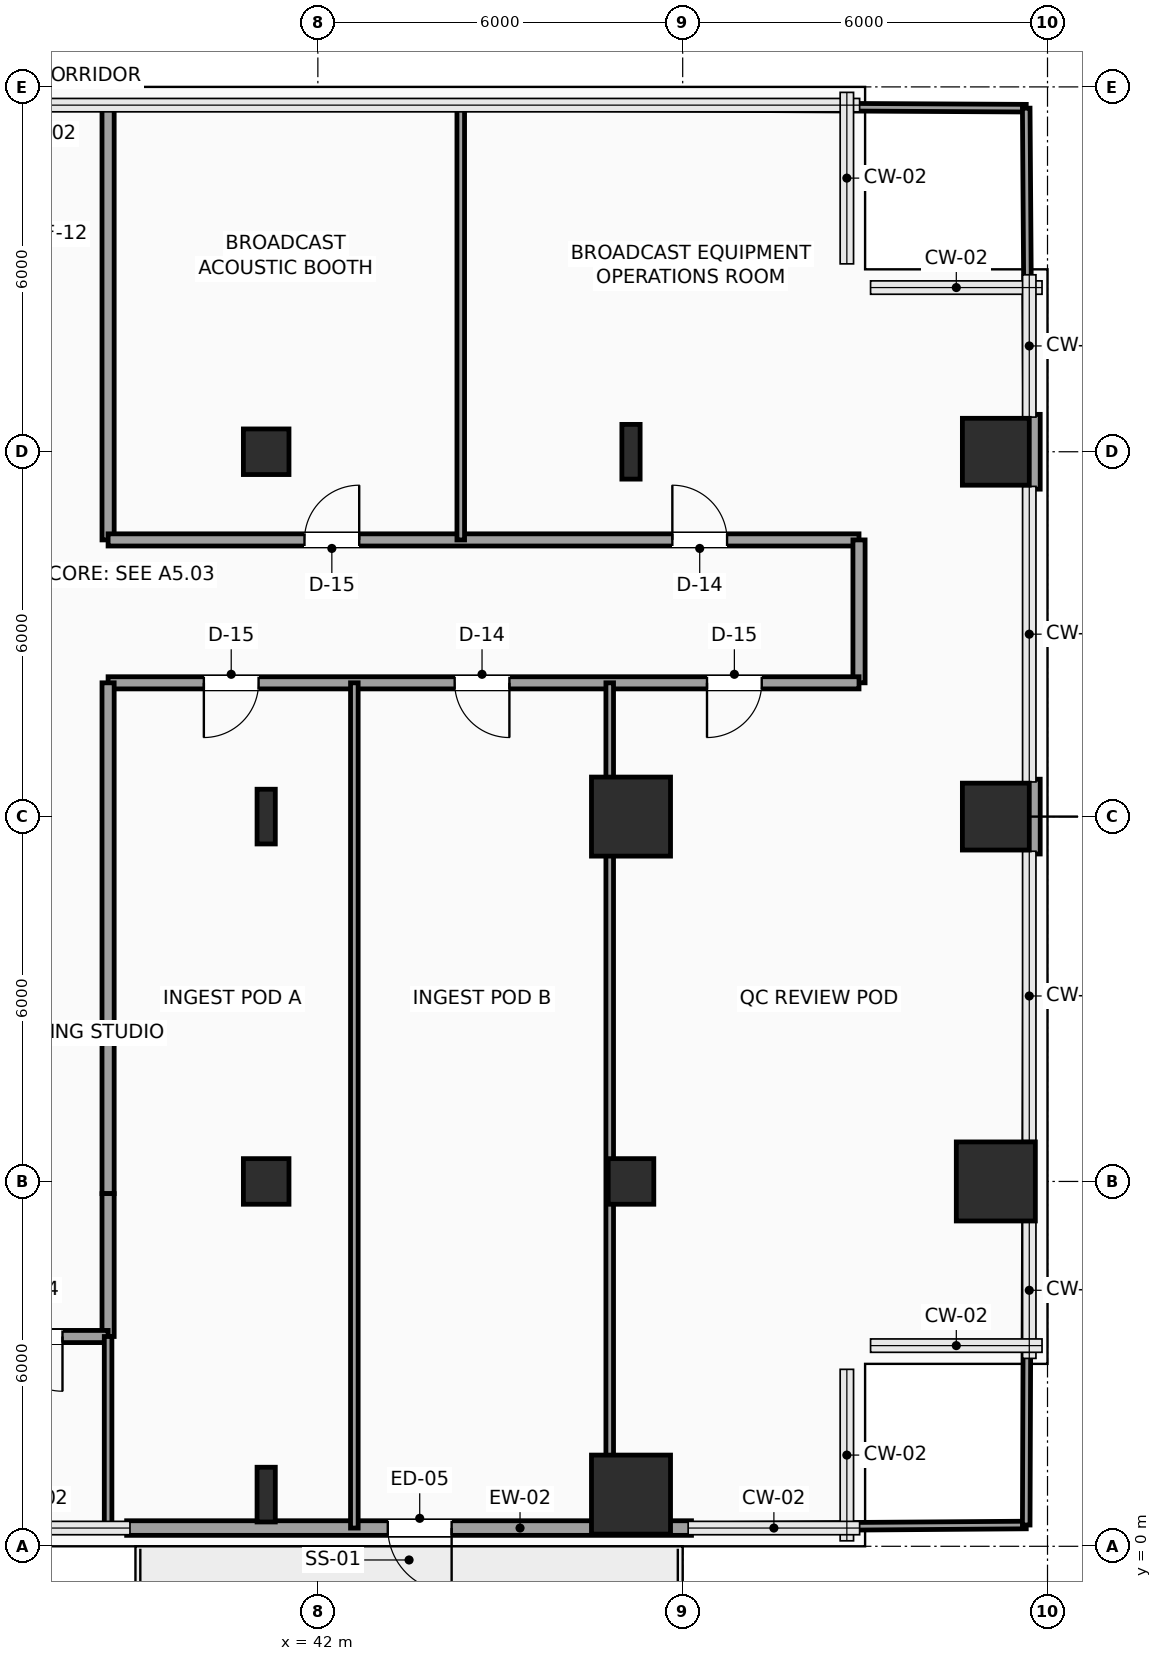
"""IFC4 building model, lengths in metres.
Left out: names, types, materials, properties, quantities, classifications, styles, units other than length and angle.
Written with IfcOpenShell. Run it as: python <this file> out.ifc"""

import sys

from ifc_helpers import new_model, si_unit, direction, frame, frame_2d, origin, origin_2d, place, context, subcontext, project, spatial, rectangle, hollow_rectangle, i_section, extrude, element, fill, save


model = new_model("IFC4")
c1 = context("Model", 3, precision=1e-05, world=origin(), true_north=direction((0.0, 1.0)))
c2 = subcontext(c1, "Body", "Model", "MODEL_VIEW")
j1 = project(units=[si_unit("LENGTHUNIT", "METRE"), si_unit("PLANEANGLEUNIT", "RADIAN")], contexts=[c1])
p1 = place(None, origin())
s1 = spatial("IfcSite", under=j1, at=p1, CompositionType="ELEMENT")
p2 = place(p1, origin())
s2 = spatial("IfcBuilding", under=s1, at=p2, CompositionType="ELEMENT")
p3 = place(p2, frame((0.0, 0.0, 44.1)))
s3 = spatial("IfcBuildingStorey", under=s2, at=p3, CompositionType="ELEMENT", Elevation=44.1)
p4 = place(p3, frame((41.15, 0.85, 0.0), z_axis=(0.0, 0.0, 1.0), x_axis=(1.0, 0.0, 0.0)))
e1 = element("IfcColumn", 1, at=p4, inside=s3, PredefinedType="COLUMN", context=c2, shape_type="SweptSolid", body=[
    extrude(i_section(OverallWidth=0.3, OverallDepth=0.9, WebThickness=0.019, FlangeThickness=0.035, FilletRadius=0.03, at=origin_2d()), origin(), (0.0, 0.0, 1.0), 3.9),
])
p5 = place(p3, frame((41.15, 6.0, 0.0), z_axis=(0.0, 0.0, 1.0), x_axis=(1.0, 0.0, 0.0)))
e2 = element("IfcColumn", 2, at=p5, inside=s3, PredefinedType="COLUMN", context=c2, shape_type="SweptSolid", body=[
    extrude(hollow_rectangle(XDim=0.75, YDim=0.75, WallThickness=0.035, InnerFilletRadius=0.035, OuterFilletRadius=0.05, at=origin_2d()), origin(), (0.0, 0.0, 1.0), 3.9),
])
p6 = place(p3, frame((41.15, 12.0, 0.0), z_axis=(0.0, 0.0, 1.0), x_axis=(1.0, 0.0, 0.0)))
e3 = element("IfcColumn", 3, at=p6, inside=s3, PredefinedType="COLUMN", context=c2, shape_type="SweptSolid", body=[
    extrude(i_section(OverallWidth=0.3, OverallDepth=0.9, WebThickness=0.019, FlangeThickness=0.035, FilletRadius=0.03, at=origin_2d()), origin(), (0.0, 0.0, 1.0), 3.9),
])
p7 = place(p3, frame((41.15, 18.0, 0.0), z_axis=(0.0, 0.0, 1.0), x_axis=(1.0, 0.0, 0.0)))
e4 = element("IfcColumn", 4, at=p7, inside=s3, PredefinedType="COLUMN", context=c2, shape_type="SweptSolid", body=[
    extrude(hollow_rectangle(XDim=0.75, YDim=0.75, WallThickness=0.035, InnerFilletRadius=0.035, OuterFilletRadius=0.05, at=origin_2d()), origin(), (0.0, 0.0, 1.0), 3.9),
])
p8 = place(p3, frame((47.15, 0.85, 0.0), z_axis=(0.0, 0.0, 1.0), x_axis=(1.0, 0.0, 0.0)))
e5 = element("IfcColumn", 5, at=p8, inside=s3, PredefinedType="COLUMN", context=c2, shape_type="SweptSolid", body=[
    extrude(rectangle(XDim=1.3, YDim=1.3, at=origin_2d()), origin(), (0.0, 0.0, 1.0), 3.9),
])
p9 = place(p3, frame((47.15, 6.0, 0.0), z_axis=(0.0, 0.0, 1.0), x_axis=(1.0, 0.0, 0.0)))
e6 = element("IfcColumn", 6, at=p9, inside=s3, PredefinedType="COLUMN", context=c2, shape_type="SweptSolid", body=[
    extrude(hollow_rectangle(XDim=0.75, YDim=0.75, WallThickness=0.035, InnerFilletRadius=0.035, OuterFilletRadius=0.05, at=origin_2d()), origin(), (0.0, 0.0, 1.0), 3.9),
])
p10 = place(p3, frame((47.15, 12.0, 0.0), z_axis=(0.0, 0.0, 1.0), x_axis=(1.0, 0.0, 0.0)))
e7 = element("IfcColumn", 7, at=p10, inside=s3, PredefinedType="COLUMN", context=c2, shape_type="SweptSolid", body=[
    extrude(rectangle(XDim=1.3, YDim=1.3, at=origin_2d()), origin(), (0.0, 0.0, 1.0), 3.9),
])
p11 = place(p3, frame((47.15, 18.0, 0.0), z_axis=(0.0, 0.0, 1.0), x_axis=(1.0, 0.0, 0.0)))
e8 = element("IfcColumn", 8, at=p11, inside=s3, PredefinedType="COLUMN", context=c2, shape_type="SweptSolid", body=[
    extrude(i_section(OverallWidth=0.3, OverallDepth=0.9, WebThickness=0.019, FlangeThickness=0.035, FilletRadius=0.03, at=origin_2d()), origin(), (0.0, 0.0, 1.0), 3.9),
])
p12 = place(p3, frame((53.15, 6.0, 0.0), z_axis=(0.0, 0.0, 1.0), x_axis=(1.0, 0.0, 0.0)))
e9 = element("IfcColumn", 9, at=p12, inside=s3, PredefinedType="COLUMN", context=c2, shape_type="SweptSolid", body=[
    extrude(rectangle(XDim=1.3, YDim=1.3, at=origin_2d()), origin(), (0.0, 0.0, 1.0), 3.9),
])
for number, where, z_axis, x_axis in (
    (10, (53.15, 12.0, 0.0), (0.0, 0.0, 1.0), (1.0, 0.0, 0.0)),
    (11, (53.15, 18.0, 0.0), (0.0, 0.0, 1.0), (1.0, 0.0, 0.0)),
):
    element("IfcColumn", number, at=place(p3, frame(where, z_axis=z_axis, x_axis=x_axis)), inside=s3, PredefinedType="COLUMN", context=c2, shape_type="SweptSolid", body=[
        extrude(rectangle(XDim=1.1, YDim=1.1, at=origin_2d()), origin(), (0.0, 0.0, 1.0), 3.9),
    ])
p13 = place(p3, frame((48.145, 0.3, 0.0), z_axis=(0.0, 0.0, 1.0), x_axis=(-1.0, 0.0, 0.0)))
e12 = element("IfcWall", 12, at=p13, inside=s3, PredefinedType="SOLIDWALL", context=c2, shape_type="SweptSolid", body=[
    extrude(rectangle(XDim=9.29, YDim=0.24, at=frame_2d((4.645, 0.0))), origin(), (0.0, 0.0, 1.0), 3.65),
])
p14 = place(p13, frame((3.945, 0.0, 0.0)))
e13 = element("IfcOpeningElement", 13, at=p14, cuts=e12, PredefinedType="OPENING", context=c2, shape_type="SweptSolid", body=[
    extrude(rectangle(XDim=1.05, YDim=2.2, at=frame_2d((0.525, 1.1))), frame((0.0, 0.13, 0.0), z_axis=(0.0, -1.0, 0.0), x_axis=(1.0, 0.0, 0.0)), (0.0, 0.0, 1.0), 0.26),
])
for number, where, z_axis, x_axis in (
    (14, (53.76, 18.615, 0.0), (0.0, 0.0, 1.0), (0.0, -1.0, 0.0)),
    (15, (53.76, 12.615, 0.0), (0.0, 0.0, 1.0), (0.0, -1.0, 0.0)),
):
    element("IfcWall", number, at=place(p3, frame(where, z_axis=z_axis, x_axis=x_axis)), inside=s3, PredefinedType="SOLIDWALL", context=c2, shape_type="SweptSolid", body=[
        extrude(rectangle(XDim=1.23, YDim=0.24, at=frame_2d((0.615, 0.0))), origin(), (0.0, 0.0, 1.0), 3.65),
    ])
p15 = place(p3, frame((38.55, 23.7, 0.0), z_axis=(0.0, 0.0, 1.0), x_axis=(0.0, -1.0, 0.0)))
e16 = element("IfcWall", 16, at=p15, inside=s3, PredefinedType="PARTITIONING", context=c2, shape_type="SweptSolid", body=[
    extrude(rectangle(XDim=7.15, YDim=0.2, at=frame_2d((3.575, 0.0))), origin(), (0.0, 0.0, 1.0), 3.65),
])
p16 = place(p3, frame((38.55, 16.55, 0.0), z_axis=(0.0, 0.0, 1.0), x_axis=(1.0, 0.0, 0.0)))
e17 = element("IfcWall", 17, at=p16, inside=s3, PredefinedType="PARTITIONING", context=c2, shape_type="SweptSolid", body=[
    extrude(rectangle(XDim=12.35, YDim=0.2, at=frame_2d((6.175, 0.0))), origin(), (0.0, 0.0, 1.0), 3.65),
])
p17 = place(p16, frame((3.23, 0.0, 0.0)))
e18 = element("IfcOpeningElement", 18, at=p17, cuts=e17, PredefinedType="OPENING", context=c2, shape_type="SweptSolid", body=[
    extrude(rectangle(XDim=0.9, YDim=2.1, at=frame_2d((0.45, 1.05))), frame((0.0, 0.11, 0.0), z_axis=(0.0, -1.0, 0.0), x_axis=(1.0, 0.0, 0.0)), (0.0, 0.0, 1.0), 0.22),
])
p18 = place(p16, frame((9.28, 0.0, 0.0)))
e19 = element("IfcOpeningElement", 19, at=p18, cuts=e17, PredefinedType="OPENING", context=c2, shape_type="SweptSolid", body=[
    extrude(rectangle(XDim=0.9, YDim=2.1, at=frame_2d((0.45, 1.05))), frame((0.0, 0.11, 0.0), z_axis=(0.0, -1.0, 0.0), x_axis=(1.0, 0.0, 0.0)), (0.0, 0.0, 1.0), 0.22),
])
p19 = place(p3, frame((50.9, 16.55, 0.0), z_axis=(0.0, 0.0, 1.0), x_axis=(0.0, -1.0, 0.0)))
e20 = element("IfcWall", 20, at=p19, inside=s3, PredefinedType="PARTITIONING", context=c2, shape_type="SweptSolid", body=[
    extrude(rectangle(XDim=2.35, YDim=0.2, at=frame_2d((1.175, 0.0))), origin(), (0.0, 0.0, 1.0), 3.65),
])
p20 = place(p3, frame((50.9, 14.2, 0.0), z_axis=(0.0, 0.0, 1.0), x_axis=(-1.0, 0.0, 0.0)))
e21 = element("IfcWall", 21, at=p20, inside=s3, PredefinedType="PARTITIONING", context=c2, shape_type="SweptSolid", body=[
    extrude(rectangle(XDim=12.35, YDim=0.2, at=frame_2d((6.175, 0.0))), origin(), (0.0, 0.0, 1.0), 3.65),
])
p21 = place(p20, frame((9.875, 0.0, 0.0)))
e22 = element("IfcOpeningElement", 22, at=p21, cuts=e21, PredefinedType="OPENING", context=c2, shape_type="SweptSolid", body=[
    extrude(rectangle(XDim=0.9, YDim=2.1, at=frame_2d((0.45, 1.05))), frame((0.0, 0.11, 0.0), z_axis=(0.0, -1.0, 0.0), x_axis=(1.0, 0.0, 0.0)), (0.0, 0.0, 1.0), 0.22),
])
p22 = place(p20, frame((5.75, 0.0, 0.0)))
e23 = element("IfcOpeningElement", 23, at=p22, cuts=e21, PredefinedType="OPENING", context=c2, shape_type="SweptSolid", body=[
    extrude(rectangle(XDim=0.9, YDim=2.1, at=frame_2d((0.45, 1.05))), frame((0.0, 0.11, 0.0), z_axis=(0.0, -1.0, 0.0), x_axis=(1.0, 0.0, 0.0)), (0.0, 0.0, 1.0), 0.22),
])
p23 = place(p20, frame((1.6, 0.0, 0.0)))
e24 = element("IfcOpeningElement", 24, at=p23, cuts=e21, PredefinedType="OPENING", context=c2, shape_type="SweptSolid", body=[
    extrude(rectangle(XDim=0.9, YDim=2.1, at=frame_2d((0.45, 1.05))), frame((0.0, 0.11, 0.0), z_axis=(0.0, -1.0, 0.0), x_axis=(1.0, 0.0, 0.0)), (0.0, 0.0, 1.0), 0.22),
])
p24 = place(p3, frame((38.55, 14.2, 0.0), z_axis=(0.0, 0.0, 1.0), x_axis=(0.0, -1.0, 0.0)))
e25 = element("IfcWall", 25, at=p24, inside=s3, PredefinedType="PARTITIONING", context=c2, shape_type="SweptSolid", body=[
    extrude(rectangle(XDim=8.4, YDim=0.2, at=frame_2d((4.2, 0.0))), origin(), (0.0, 0.0, 1.0), 3.65),
])
p25 = place(p3, frame((38.55, 5.8, 0.0), z_axis=(0.0, 0.0, 1.0), x_axis=(0.0, -1.0, 0.0)))
e26 = element("IfcWall", 26, at=p25, inside=s3, PredefinedType="PARTITIONING", context=c2, shape_type="SweptSolid", body=[
    extrude(rectangle(XDim=2.35, YDim=0.2, at=frame_2d((1.175, 0.0))), origin(), (0.0, 0.0, 1.0), 3.65),
])
p26 = place(p3, frame((38.55, 3.45, 0.0), z_axis=(0.0, 0.0, 1.0), x_axis=(-1.0, 0.0, 0.0)))
e27 = element("IfcWall", 27, at=p26, inside=s3, PredefinedType="PARTITIONING", context=c2, shape_type="SweptSolid", body=[
    extrude(rectangle(XDim=2.4, YDim=0.2, at=frame_2d((1.2, 0.0))), origin(), (0.0, 0.0, 1.0), 3.142),
])
p27 = place(p26, frame((0.75, 0.0, 0.0)))
e28 = element("IfcOpeningElement", 28, at=p27, cuts=e27, PredefinedType="OPENING", context=c2, shape_type="SweptSolid", body=[
    extrude(rectangle(XDim=0.9, YDim=2.1, at=frame_2d((0.45, 1.05))), frame((0.0, 0.11, 0.0), z_axis=(0.0, -1.0, 0.0), x_axis=(1.0, 0.0, 0.0)), (0.0, 0.0, 1.0), 0.22),
])
for number, where, z_axis, x_axis in (
    (29, (42.6, 0.3, 0.0), (0.0, 0.0, 1.0), (0.0, 1.0, 0.0)),
    (30, (46.8, 0.3, 0.0), (0.0, 0.0, 1.0), (0.0, 1.0, 0.0)),
):
    element("IfcWall", number, at=place(p3, frame(where, z_axis=z_axis, x_axis=x_axis)), inside=s3, PredefinedType="PARTITIONING", context=c2, shape_type="SweptSolid", body=[
        extrude(rectangle(XDim=13.9, YDim=0.125, at=frame_2d((6.95, 0.0))), origin(), (0.0, 0.0, 1.0), 3.65),
    ])
p28 = place(p3, frame((48.145, 0.31, 0.0), z_axis=(0.0, 0.0, 1.0), x_axis=(0.999973226546, 0.007317526272, 0.0)))
e31 = element("IfcWall", 31, at=p28, inside=s3, PredefinedType="PARTITIONING", context=c2, shape_type="SweptSolid", body=[
    extrude(rectangle(XDim=5.505, YDim=0.125, at=frame_2d((2.752, 0.0))), origin(), (0.0, 0.0, 1.0), 3.65),
])
p29 = place(p3, frame((53.65, 0.35, 0.0), z_axis=(0.0, 0.0, 1.0), x_axis=(0.003606251025, 0.999993497456, 0.0)))
e32 = element("IfcWall", 32, at=p29, inside=s3, PredefinedType="PARTITIONING", context=c2, shape_type="SweptSolid", body=[
    extrude(rectangle(XDim=11.035, YDim=0.125, at=frame_2d((5.518, 0.0))), origin(), (0.0, 0.0, 1.0), 3.65),
])
p30 = place(p3, frame((53.694, 12.615, 0.0), z_axis=(0.0, 0.0, 1.0), x_axis=(0.003542799701, 0.999993724265, 0.0)))
e33 = element("IfcWall", 33, at=p30, inside=s3, PredefinedType="PARTITIONING", context=c2, shape_type="SweptSolid", body=[
    extrude(rectangle(XDim=1.585, YDim=0.125, at=frame_2d((0.792, 0.0))), origin(), (0.0, 0.0, 1.0), 3.65),
])
p31 = place(p3, frame((44.35, 16.55, 0.0), z_axis=(0.0, 0.0, 1.0), x_axis=(0.0, 1.0, 0.0)))
e34 = element("IfcWall", 34, at=p31, inside=s3, PredefinedType="PARTITIONING", context=c2, shape_type="SweptSolid", body=[
    extrude(rectangle(XDim=7.15, YDim=0.125, at=frame_2d((3.575, 0.0))), origin(), (0.0, 0.0, 1.0), 3.65),
])
p32 = place(p3, frame((44.35, 23.7, 0.0), z_axis=(0.0, 0.0, 1.0), x_axis=(0.999985518927, -0.005381629512, 0.0)))
e35 = element("IfcWall", 35, at=p32, inside=s3, PredefinedType="PARTITIONING", context=c2, shape_type="SweptSolid", body=[
    extrude(rectangle(XDim=9.3, YDim=0.125, at=frame_2d((4.65, 0.0))), origin(), (0.0, 0.0, 1.0), 3.65),
])
p33 = place(p3, frame((53.7, 16.55, 0.0), z_axis=(0.0, 0.0, 1.0), x_axis=(-0.007017371073, 0.999975377948, 0.0)))
e36 = element("IfcWall", 36, at=p33, inside=s3, PredefinedType="PARTITIONING", context=c2, shape_type="SweptSolid", body=[
    extrude(rectangle(XDim=0.835, YDim=0.125, at=frame_2d((0.417, 0.0))), origin(), (0.0, 0.0, 1.0), 3.65),
])
p34 = place(p3, frame((53.686, 18.615, 0.0), z_axis=(0.0, 0.0, 1.0), x_axis=(-0.007079296972, 0.999974941463, 0.0)))
e37 = element("IfcWall", 37, at=p34, inside=s3, PredefinedType="PARTITIONING", context=c2, shape_type="SweptSolid", body=[
    extrude(rectangle(XDim=5.035, YDim=0.125, at=frame_2d((2.518, 0.0))), origin(), (0.0, 0.0, 1.0), 3.65),
])
p35 = place(p3, frame((38.55, 0.3, 0.0), z_axis=(0.0, 0.0, 1.0), x_axis=(0.0, 1.0, 0.0)))
e38 = element("IfcWall", 38, at=p35, inside=s3, PredefinedType="PARTITIONING", context=c2, shape_type="SweptSolid", body=[
    extrude(rectangle(XDim=3.15, YDim=0.125, at=frame_2d((1.575, 0.0))), origin(), (0.0, 0.0, 1.0), 3.65),
])
p36 = place(p14, origin())
e39 = element("IfcDoor", 39, at=p36, inside=s3, OperationType="SINGLE_SWING_LEFT", PredefinedType="DOOR", context=c2, shape_type="SweptSolid", body=[
    extrude(rectangle(XDim=1.05, YDim=2.2, at=frame_2d((0.525, 1.1))), frame((0.0, 0.025, 0.0), z_axis=(0.0, -1.0, 0.0), x_axis=(1.0, 0.0, 0.0)), (0.0, 0.0, 1.0), 0.05),
])
fill(e13, e39)
p37 = place(p17, origin())
e40 = element("IfcDoor", 40, at=p37, inside=s3, OperationType="SINGLE_SWING_RIGHT", PredefinedType="DOOR", context=c2, shape_type="SweptSolid", body=[
    extrude(rectangle(XDim=0.9, YDim=2.1, at=frame_2d((0.45, 1.05))), frame((0.0, 0.025, 0.0), z_axis=(0.0, -1.0, 0.0), x_axis=(1.0, 0.0, 0.0)), (0.0, 0.0, 1.0), 0.05),
])
fill(e18, e40)
p38 = place(p18, origin())
e41 = element("IfcDoor", 41, at=p38, inside=s3, OperationType="SINGLE_SWING_LEFT", PredefinedType="DOOR", context=c2, shape_type="SweptSolid", body=[
    extrude(rectangle(XDim=0.9, YDim=2.1, at=frame_2d((0.45, 1.05))), frame((0.0, 0.025, 0.0), z_axis=(0.0, -1.0, 0.0), x_axis=(1.0, 0.0, 0.0)), (0.0, 0.0, 1.0), 0.05),
])
fill(e19, e41)
p39 = place(p21, origin())
e42 = element("IfcDoor", 42, at=p39, inside=s3, OperationType="SINGLE_SWING_RIGHT", PredefinedType="DOOR", context=c2, shape_type="SweptSolid", body=[
    extrude(rectangle(XDim=0.9, YDim=2.1, at=frame_2d((0.45, 1.05))), frame((0.0, 0.025, 0.0), z_axis=(0.0, -1.0, 0.0), x_axis=(1.0, 0.0, 0.0)), (0.0, 0.0, 1.0), 0.05),
])
fill(e22, e42)
p40 = place(p22, origin())
e43 = element("IfcDoor", 43, at=p40, inside=s3, OperationType="SINGLE_SWING_LEFT", PredefinedType="DOOR", context=c2, shape_type="SweptSolid", body=[
    extrude(rectangle(XDim=0.9, YDim=2.1, at=frame_2d((0.45, 1.05))), frame((0.0, 0.025, 0.0), z_axis=(0.0, -1.0, 0.0), x_axis=(1.0, 0.0, 0.0)), (0.0, 0.0, 1.0), 0.05),
])
fill(e23, e43)
p41 = place(p23, origin())
e44 = element("IfcDoor", 44, at=p41, inside=s3, OperationType="SINGLE_SWING_RIGHT", PredefinedType="DOOR", context=c2, shape_type="SweptSolid", body=[
    extrude(rectangle(XDim=0.9, YDim=2.1, at=frame_2d((0.45, 1.05))), frame((0.0, 0.025, 0.0), z_axis=(0.0, -1.0, 0.0), x_axis=(1.0, 0.0, 0.0)), (0.0, 0.0, 1.0), 0.05),
])
fill(e24, e44)
p42 = place(p27, origin())
e45 = element("IfcDoor", 45, at=p42, inside=s3, OperationType="SINGLE_SWING_LEFT", PredefinedType="DOOR", context=c2, shape_type="SweptSolid", body=[
    extrude(rectangle(XDim=0.9, YDim=2.1, at=frame_2d((0.45, 1.05))), frame((0.0, 0.025, 0.0), z_axis=(0.0, -1.0, 0.0), x_axis=(1.0, 0.0, 0.0)), (0.0, 0.0, 1.0), 0.05),
])
fill(e28, e45)
save(model, sys.argv[1])
